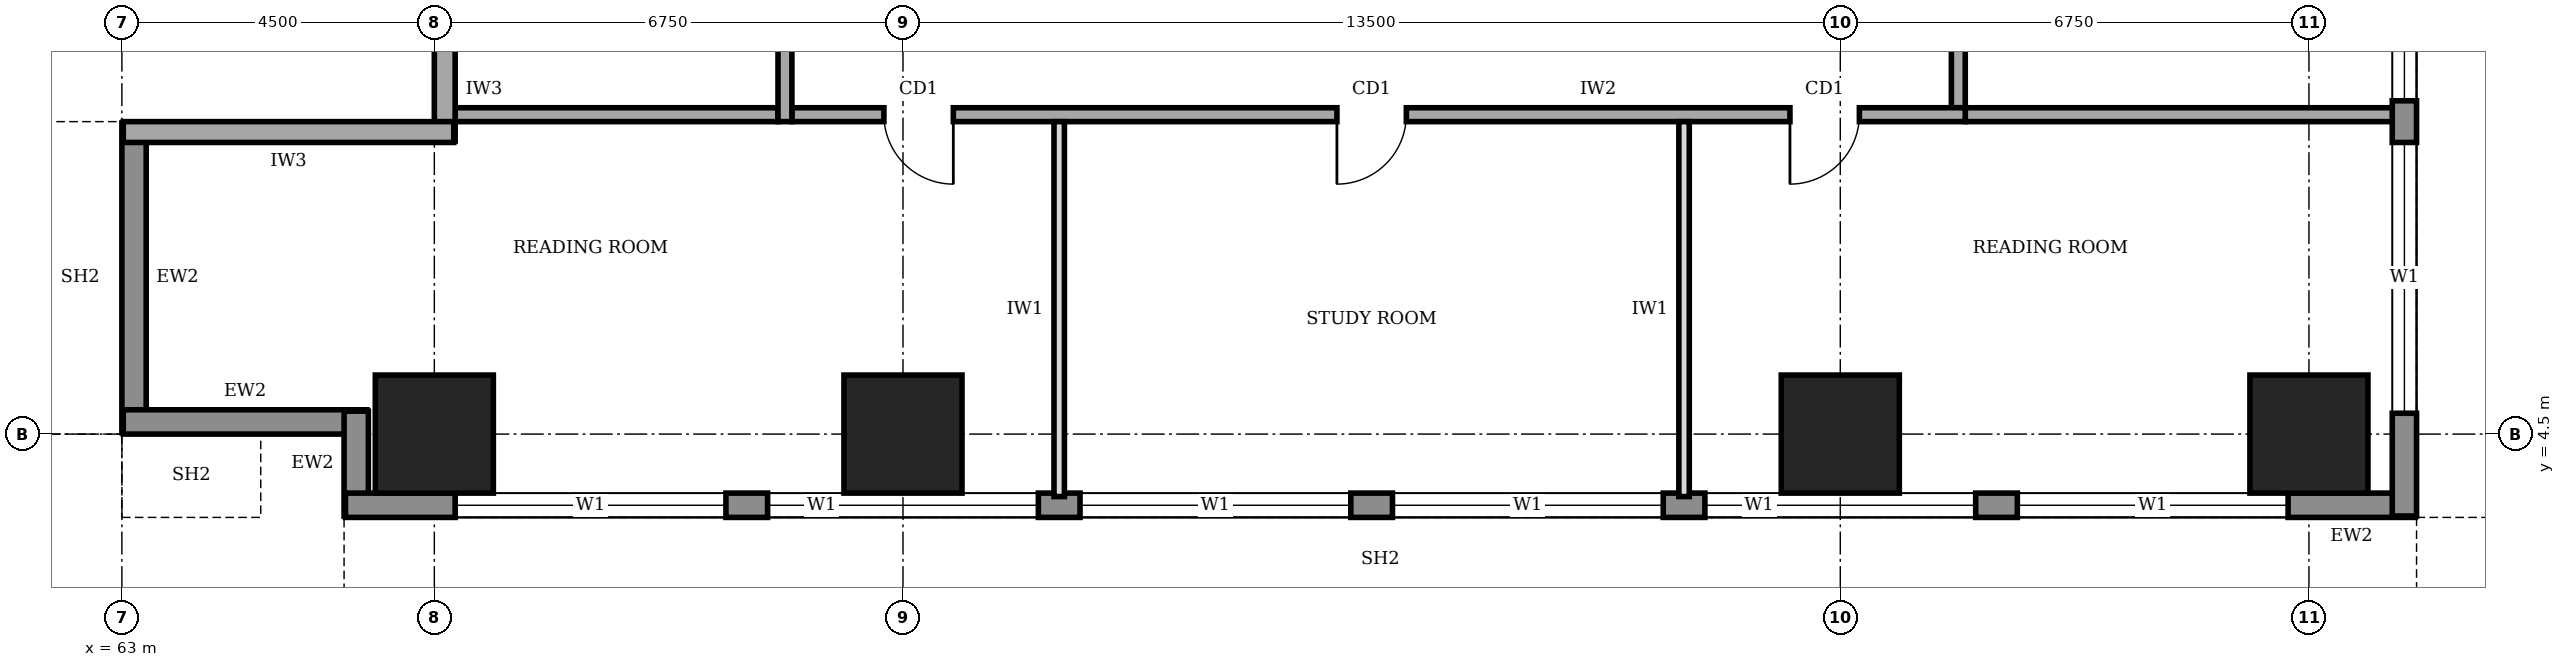
"""IFC4 building model, lengths in metres.
Left out: names, types, materials, properties, quantities, classifications, styles, units other than length and angle.
Written with IfcOpenShell. Run it as: python <this file> out.ifc"""

import sys

from ifc_helpers import new_model, si_unit, direction, frame, frame_2d, origin, origin_2d, place, context, subcontext, project, spatial, rectangle, extrude, element, fill, save


model = new_model("IFC4")
c1 = context("Model", 3, precision=1e-05, world=origin(), true_north=direction((0.0, 1.0)))
c2 = subcontext(c1, "Body", "Model", "MODEL_VIEW")
j1 = project(units=[si_unit("LENGTHUNIT", "METRE"), si_unit("PLANEANGLEUNIT", "RADIAN")], contexts=[c1])
p1 = place(None, origin())
s1 = spatial("IfcSite", under=j1, at=p1, CompositionType="ELEMENT")
p2 = place(p1, origin())
s2 = spatial("IfcBuilding", under=s1, at=p2, CompositionType="ELEMENT")
p3 = place(p2, frame((0.0, 0.0, 105.0)))
s3 = spatial("IfcBuildingStorey", under=s2, at=p3, CompositionType="ELEMENT", Elevation=105.0)
for number, where, z_axis, x_axis in (
    (1, (67.5, 4.5, 0.0), (0.0, 0.0, 1.0), (1.0, 0.0, 0.0)),
    (2, (74.25, 4.5, 0.0), (0.0, 0.0, 1.0), (1.0, 0.0, 0.0)),
    (3, (87.75, 4.5, 0.0), (0.0, 0.0, 1.0), (1.0, 0.0, 0.0)),
    (4, (94.5, 4.5, 0.0), (0.0, 0.0, 1.0), (1.0, 0.0, 0.0)),
):
    element("IfcColumn", number, at=place(p3, frame(where, z_axis=z_axis, x_axis=x_axis)), inside=s3, PredefinedType="COLUMN", context=c2, shape_type="SweptSolid", body=[
        extrude(rectangle(XDim=1.7, YDim=1.7, at=origin_2d()), origin(), (0.0, 0.0, 1.0), 4.0),
    ])
p4 = place(p3, frame((63.175, 8.98, 0.0), z_axis=(0.0, 0.0, 1.0), x_axis=(0.0, -1.0, 0.0)))
e5 = element("IfcWall", 5, at=p4, inside=s3, PredefinedType="STANDARD", context=c2, shape_type="SweptSolid", body=[
    extrude(rectangle(XDim=4.46, YDim=0.35, at=frame_2d((2.23, 0.0))), origin(), (0.0, 0.0, 1.0), 3.75),
])
p5 = place(p3, frame((63.02, 4.675, 0.0), z_axis=(0.0, 0.0, 1.0), x_axis=(1.0, 0.0, 0.0)))
e6 = element("IfcWall", 6, at=p5, inside=s3, PredefinedType="STANDARD", context=c2, shape_type="SweptSolid", body=[
    extrude(rectangle(XDim=3.51, YDim=0.35, at=frame_2d((1.755, 0.0))), origin(), (0.0, 0.0, 1.0), 2.85),
])
p6 = place(p3, frame((66.375, 4.83, 0.0), z_axis=(0.0, 0.0, 1.0), x_axis=(0.0, -1.0, 0.0)))
e7 = element("IfcWall", 7, at=p6, inside=s3, PredefinedType="STANDARD", context=c2, shape_type="SweptSolid", body=[
    extrude(rectangle(XDim=1.51, YDim=0.35, at=frame_2d((0.755, 0.0))), origin(), (0.0, 0.0, 1.0), 3.75),
])
p7 = place(p3, frame((66.22, 3.475, 0.0), z_axis=(0.0, 0.0, 1.0), x_axis=(1.0, 0.0, 0.0)))
e8 = element("IfcWall", 8, at=p7, inside=s3, PredefinedType="STANDARD", context=c2, shape_type="SweptSolid", body=[
    extrude(rectangle(XDim=29.81, YDim=0.35, at=frame_2d((14.905, 0.0))), origin(), (0.0, 0.0, 1.0), 3.75),
])
p8 = place(p7, frame((1.58, 0.0, 0.9)))
e9 = element("IfcOpeningElement", 9, at=p8, cuts=e8, PredefinedType="OPENING", context=c2, shape_type="SweptSolid", body=[
    extrude(rectangle(XDim=3.9, YDim=2.2, at=frame_2d((1.95, 1.1))), frame((0.0, 0.185, 0.0), z_axis=(0.0, -1.0, 0.0), x_axis=(1.0, 0.0, 0.0)), (0.0, 0.0, 1.0), 0.37),
])
p9 = place(p7, frame((6.08, 0.0, 0.9)))
e10 = element("IfcOpeningElement", 10, at=p9, cuts=e8, PredefinedType="OPENING", context=c2, shape_type="SweptSolid", body=[
    extrude(rectangle(XDim=3.9, YDim=2.2, at=frame_2d((1.95, 1.1))), frame((0.0, 0.185, 0.0), z_axis=(0.0, -1.0, 0.0), x_axis=(1.0, 0.0, 0.0)), (0.0, 0.0, 1.0), 0.37),
])
p10 = place(p7, frame((10.58, 0.0, 0.9)))
e11 = element("IfcOpeningElement", 11, at=p10, cuts=e8, PredefinedType="OPENING", context=c2, shape_type="SweptSolid", body=[
    extrude(rectangle(XDim=3.9, YDim=2.2, at=frame_2d((1.95, 1.1))), frame((0.0, 0.185, 0.0), z_axis=(0.0, -1.0, 0.0), x_axis=(1.0, 0.0, 0.0)), (0.0, 0.0, 1.0), 0.37),
])
p11 = place(p7, frame((15.08, 0.0, 0.9)))
e12 = element("IfcOpeningElement", 12, at=p11, cuts=e8, PredefinedType="OPENING", context=c2, shape_type="SweptSolid", body=[
    extrude(rectangle(XDim=3.9, YDim=2.2, at=frame_2d((1.95, 1.1))), frame((0.0, 0.185, 0.0), z_axis=(0.0, -1.0, 0.0), x_axis=(1.0, 0.0, 0.0)), (0.0, 0.0, 1.0), 0.37),
])
p12 = place(p7, frame((19.58, 0.0, 0.9)))
e13 = element("IfcOpeningElement", 13, at=p12, cuts=e8, PredefinedType="OPENING", context=c2, shape_type="SweptSolid", body=[
    extrude(rectangle(XDim=3.9, YDim=2.2, at=frame_2d((1.95, 1.1))), frame((0.0, 0.185, 0.0), z_axis=(0.0, -1.0, 0.0), x_axis=(1.0, 0.0, 0.0)), (0.0, 0.0, 1.0), 0.37),
])
p13 = place(p7, frame((24.08, 0.0, 0.9)))
e14 = element("IfcOpeningElement", 14, at=p13, cuts=e8, PredefinedType="OPENING", context=c2, shape_type="SweptSolid", body=[
    extrude(rectangle(XDim=3.9, YDim=2.2, at=frame_2d((1.95, 1.1))), frame((0.0, 0.185, 0.0), z_axis=(0.0, -1.0, 0.0), x_axis=(1.0, 0.0, 0.0)), (0.0, 0.0, 1.0), 0.37),
])
p14 = place(p3, frame((95.875, 3.32, 0.0), z_axis=(0.0, 0.0, 1.0), x_axis=(0.0, 1.0, 0.0)))
e15 = element("IfcWall", 15, at=p14, inside=s3, PredefinedType="STANDARD", context=c2, shape_type="SweptSolid", body=[
    extrude(rectangle(XDim=33.96, YDim=0.35, at=frame_2d((16.98, 0.0))), origin(), (0.0, 0.0, 1.0), 3.75),
])
p15 = place(p14, frame((1.48, 0.0, 0.9)))
e16 = element("IfcOpeningElement", 16, at=p15, cuts=e15, PredefinedType="OPENING", context=c2, shape_type="SweptSolid", body=[
    extrude(rectangle(XDim=3.9, YDim=2.2, at=frame_2d((1.95, 1.1))), frame((0.0, 0.185, 0.0), z_axis=(0.0, -1.0, 0.0), x_axis=(1.0, 0.0, 0.0)), (0.0, 0.0, 1.0), 0.37),
])
p16 = place(p14, frame((5.98, 0.0, 0.9)))
e17 = element("IfcOpeningElement", 17, at=p16, cuts=e15, PredefinedType="OPENING", context=c2, shape_type="SweptSolid", body=[
    extrude(rectangle(XDim=3.9, YDim=2.2, at=frame_2d((1.95, 1.1))), frame((0.0, 0.185, 0.0), z_axis=(0.0, -1.0, 0.0), x_axis=(1.0, 0.0, 0.0)), (0.0, 0.0, 1.0), 0.37),
])
p17 = place(p14, frame((10.48, 0.0, 0.9)))
e18 = element("IfcOpeningElement", 18, at=p17, cuts=e15, PredefinedType="OPENING", context=c2, shape_type="SweptSolid", body=[
    extrude(rectangle(XDim=3.9, YDim=2.2, at=frame_2d((1.95, 1.1))), frame((0.0, 0.185, 0.0), z_axis=(0.0, -1.0, 0.0), x_axis=(1.0, 0.0, 0.0)), (0.0, 0.0, 1.0), 0.37),
])
p18 = place(p14, frame((14.98, 0.0, 0.9)))
e19 = element("IfcOpeningElement", 19, at=p18, cuts=e15, PredefinedType="OPENING", context=c2, shape_type="SweptSolid", body=[
    extrude(rectangle(XDim=3.9, YDim=2.2, at=frame_2d((1.95, 1.1))), frame((0.0, 0.185, 0.0), z_axis=(0.0, -1.0, 0.0), x_axis=(1.0, 0.0, 0.0)), (0.0, 0.0, 1.0), 0.37),
])
p19 = place(p14, frame((19.48, 0.0, 0.9)))
e20 = element("IfcOpeningElement", 20, at=p19, cuts=e15, PredefinedType="OPENING", context=c2, shape_type="SweptSolid", body=[
    extrude(rectangle(XDim=3.9, YDim=2.2, at=frame_2d((1.95, 1.1))), frame((0.0, 0.185, 0.0), z_axis=(0.0, -1.0, 0.0), x_axis=(1.0, 0.0, 0.0)), (0.0, 0.0, 1.0), 0.37),
])
p20 = place(p14, frame((23.98, 0.0, 0.9)))
e21 = element("IfcOpeningElement", 21, at=p20, cuts=e15, PredefinedType="OPENING", context=c2, shape_type="SweptSolid", body=[
    extrude(rectangle(XDim=3.9, YDim=2.2, at=frame_2d((1.95, 1.1))), frame((0.0, 0.185, 0.0), z_axis=(0.0, -1.0, 0.0), x_axis=(1.0, 0.0, 0.0)), (0.0, 0.0, 1.0), 0.37),
])
p21 = place(p14, frame((28.48, 0.0, 0.9)))
e22 = element("IfcOpeningElement", 22, at=p21, cuts=e15, PredefinedType="OPENING", context=c2, shape_type="SweptSolid", body=[
    extrude(rectangle(XDim=3.9, YDim=2.2, at=frame_2d((1.95, 1.1))), frame((0.0, 0.185, 0.0), z_axis=(0.0, -1.0, 0.0), x_axis=(1.0, 0.0, 0.0)), (0.0, 0.0, 1.0), 0.37),
])
p22 = place(p3, frame((67.65, 10.2, 0.0), z_axis=(0.0, 0.0, 1.0), x_axis=(0.0, -1.0, 0.0)))
e23 = element("IfcWall", 23, at=p22, inside=s3, PredefinedType="SOLIDWALL", context=c2, shape_type="SweptSolid", body=[
    extrude(rectangle(XDim=1.48, YDim=0.3, at=frame_2d((0.74, 0.0))), origin(), (0.0, 0.0, 1.0), 2.65),
])
p23 = place(p3, frame((67.78, 8.85, 0.0), z_axis=(0.0, 0.0, 1.0), x_axis=(-1.0, 0.0, 0.0)))
e24 = element("IfcWall", 24, at=p23, inside=s3, PredefinedType="SOLIDWALL", context=c2, shape_type="SweptSolid", body=[
    extrude(rectangle(XDim=4.76, YDim=0.3, at=frame_2d((2.38, 0.0))), origin(), (0.0, 0.0, 1.0), 3.75),
])
p24 = place(p3, frame((72.65, 9.1, 0.0), z_axis=(0.0, 0.0, 1.0), x_axis=(1.0, 0.0, 0.0)))
e25 = element("IfcWall", 25, at=p24, inside=s3, PredefinedType="SOLIDWALL", context=c2, shape_type="SweptSolid", body=[
    extrude(rectangle(XDim=16.9, YDim=0.2, at=frame_2d((8.45, 0.0))), origin(), (0.0, 0.0, 1.0), 3.75),
])
p25 = place(p24, frame((1.325, 0.0, 0.0)))
e26 = element("IfcOpeningElement", 26, at=p25, cuts=e25, PredefinedType="OPENING", context=c2, shape_type="SweptSolid", body=[
    extrude(rectangle(XDim=1.0, YDim=2.1, at=frame_2d((0.5, 1.05))), frame((0.0, 0.11, 0.0), z_axis=(0.0, -1.0, 0.0), x_axis=(1.0, 0.0, 0.0)), (0.0, 0.0, 1.0), 0.22),
])
p26 = place(p24, frame((7.85, 0.0, 0.0)))
e27 = element("IfcOpeningElement", 27, at=p26, cuts=e25, PredefinedType="OPENING", context=c2, shape_type="SweptSolid", body=[
    extrude(rectangle(XDim=1.0, YDim=2.1, at=frame_2d((0.5, 1.05))), frame((0.0, 0.11, 0.0), z_axis=(0.0, -1.0, 0.0), x_axis=(1.0, 0.0, 0.0)), (0.0, 0.0, 1.0), 0.22),
])
p27 = place(p24, frame((14.375, 0.0, 0.0)))
e28 = element("IfcOpeningElement", 28, at=p27, cuts=e25, PredefinedType="OPENING", context=c2, shape_type="SweptSolid", body=[
    extrude(rectangle(XDim=1.0, YDim=2.1, at=frame_2d((0.5, 1.05))), frame((0.0, 0.11, 0.0), z_axis=(0.0, -1.0, 0.0), x_axis=(1.0, 0.0, 0.0)), (0.0, 0.0, 1.0), 0.22),
])
p28 = place(p3, frame((89.45, 9.2, 0.0), z_axis=(0.0, 0.0, 1.0), x_axis=(0.0, 1.0, 0.0)))
e29 = element("IfcWall", 29, at=p28, inside=s3, PredefinedType="SOLIDWALL", context=c2, shape_type="SweptSolid", body=[
    extrude(rectangle(XDim=23.8, YDim=0.2, at=frame_2d((11.9, 0.0))), origin(), (0.0, 0.0, 1.0), 3.75),
])
p29 = place(p28, frame((1.625, 0.0, 0.0)))
e30 = element("IfcOpeningElement", 30, at=p29, cuts=e29, PredefinedType="OPENING", context=c2, shape_type="SweptSolid", body=[
    extrude(rectangle(XDim=1.0, YDim=2.1, at=frame_2d((0.5, 1.05))), frame((0.0, 0.11, 0.0), z_axis=(0.0, -1.0, 0.0), x_axis=(1.0, 0.0, 0.0)), (0.0, 0.0, 1.0), 0.22),
])
p30 = place(p28, frame((5.2, 0.0, 0.0)))
e31 = element("IfcOpeningElement", 31, at=p30, cuts=e29, PredefinedType="OPENING", context=c2, shape_type="SweptSolid", body=[
    extrude(rectangle(XDim=0.9, YDim=2.1, at=frame_2d((0.45, 1.05))), frame((0.0, 0.11, 0.0), z_axis=(0.0, -1.0, 0.0), x_axis=(1.0, 0.0, 0.0)), (0.0, 0.0, 1.0), 0.22),
])
p31 = place(p28, frame((8.325, 0.0, 0.0)))
e32 = element("IfcOpeningElement", 32, at=p31, cuts=e29, PredefinedType="OPENING", context=c2, shape_type="SweptSolid", body=[
    extrude(rectangle(XDim=0.9, YDim=2.1, at=frame_2d((0.45, 1.05))), frame((0.0, 0.11, 0.0), z_axis=(0.0, -1.0, 0.0), x_axis=(1.0, 0.0, 0.0)), (0.0, 0.0, 1.0), 0.22),
])
p32 = place(p28, frame((13.725, 0.0, 0.0)))
e33 = element("IfcOpeningElement", 33, at=p32, cuts=e29, PredefinedType="OPENING", context=c2, shape_type="SweptSolid", body=[
    extrude(rectangle(XDim=0.9, YDim=2.1, at=frame_2d((0.45, 1.05))), frame((0.0, 0.11, 0.0), z_axis=(0.0, -1.0, 0.0), x_axis=(1.0, 0.0, 0.0)), (0.0, 0.0, 1.0), 0.22),
])
p33 = place(p28, frame((16.15, 0.0, 0.0)))
e34 = element("IfcOpeningElement", 34, at=p33, cuts=e29, PredefinedType="OPENING", context=c2, shape_type="SweptSolid", body=[
    extrude(rectangle(XDim=1.0, YDim=2.1, at=frame_2d((0.5, 1.05))), frame((0.0, 0.11, 0.0), z_axis=(0.0, -1.0, 0.0), x_axis=(1.0, 0.0, 0.0)), (0.0, 0.0, 1.0), 0.22),
])
p34 = place(p28, frame((11.2, 0.0, 0.0)))
e35 = element("IfcOpeningElement", 35, at=p34, cuts=e29, PredefinedType="OPENING", context=c2, shape_type="SweptSolid", body=[
    extrude(rectangle(XDim=1.0, YDim=2.1, at=frame_2d((0.5, 1.05))), frame((0.0, 0.11, 0.0), z_axis=(0.0, -1.0, 0.0), x_axis=(1.0, 0.0, 0.0)), (0.0, 0.0, 1.0), 0.22),
])
p35 = place(p28, frame((20.225, 0.0, 0.0)))
e36 = element("IfcOpeningElement", 36, at=p35, cuts=e29, PredefinedType="OPENING", context=c2, shape_type="SweptSolid", body=[
    extrude(rectangle(XDim=1.0, YDim=2.1, at=frame_2d((0.5, 1.05))), frame((0.0, 0.11, 0.0), z_axis=(0.0, -1.0, 0.0), x_axis=(1.0, 0.0, 0.0)), (0.0, 0.0, 1.0), 0.22),
])
p36 = place(p3, frame((72.55, 32.8, 0.0), z_axis=(0.0, 0.0, 1.0), x_axis=(0.0, -1.0, 0.0)))
e37 = element("IfcWall", 37, at=p36, inside=s3, PredefinedType="SOLIDWALL", context=c2, shape_type="SweptSolid", body=[
    extrude(rectangle(XDim=23.8, YDim=0.2, at=frame_2d((11.9, 0.0))), origin(), (0.0, 0.0, 1.0), 3.75),
])
p37 = place(p36, frame((10.9, 0.0, 0.0)))
e38 = element("IfcOpeningElement", 38, at=p37, cuts=e37, PredefinedType="OPENING", context=c2, shape_type="SweptSolid", body=[
    extrude(rectangle(XDim=1.8, YDim=2.1, at=frame_2d((0.9, 1.05))), frame((0.0, 0.11, 0.0), z_axis=(0.0, -1.0, 0.0), x_axis=(1.0, 0.0, 0.0)), (0.0, 0.0, 1.0), 0.22),
])
p38 = place(p3, frame((67.8, 9.1, 0.0), z_axis=(0.0, 0.0, 1.0), x_axis=(1.0, 0.0, 0.0)))
e39 = element("IfcWall", 39, at=p38, inside=s3, PredefinedType="SOLIDWALL", context=c2, shape_type="SweptSolid", body=[
    extrude(rectangle(XDim=4.65, YDim=0.2, at=frame_2d((2.325, 0.0))), origin(), (0.0, 0.0, 1.0), 3.75),
])
p39 = place(p3, frame((89.55, 9.1, 0.0), z_axis=(0.0, 0.0, 1.0), x_axis=(1.0, 0.0, 0.0)))
e40 = element("IfcWall", 40, at=p39, inside=s3, PredefinedType="SOLIDWALL", context=c2, shape_type="SweptSolid", body=[
    extrude(rectangle(XDim=6.2, YDim=0.2, at=frame_2d((3.1, 0.0))), origin(), (0.0, 0.0, 1.0), 3.75),
])
for number, where, z_axis, x_axis in (
    (41, (76.5, 3.6, 0.0), (0.0, 0.0, 1.0), (0.0, 1.0, 0.0)),
    (42, (85.5, 3.6, 0.0), (0.0, 0.0, 1.0), (0.0, 1.0, 0.0)),
):
    element("IfcWall", number, at=place(p3, frame(where, z_axis=z_axis, x_axis=x_axis)), inside=s3, PredefinedType="PARTITIONING", context=c2, shape_type="SweptSolid", body=[
        extrude(rectangle(XDim=5.4, YDim=0.15, at=frame_2d((2.7, 0.0))), origin(), (0.0, 0.0, 1.0), 3.75),
    ])
p40 = place(p8, origin())
e43 = element("IfcWindow", 43, at=p40, inside=s3, PartitioningType="SINGLE_PANEL", PredefinedType="WINDOW", context=c2, shape_type="SweptSolid", body=[
    extrude(rectangle(XDim=3.9, YDim=2.2, at=frame_2d((1.95, 1.1))), frame((0.0, 0.03, 0.0), z_axis=(0.0, -1.0, 0.0), x_axis=(1.0, 0.0, 0.0)), (0.0, 0.0, 1.0), 0.06),
])
fill(e9, e43)
p41 = place(p9, origin())
e44 = element("IfcWindow", 44, at=p41, inside=s3, PartitioningType="SINGLE_PANEL", PredefinedType="WINDOW", context=c2, shape_type="SweptSolid", body=[
    extrude(rectangle(XDim=3.9, YDim=2.2, at=frame_2d((1.95, 1.1))), frame((0.0, 0.03, 0.0), z_axis=(0.0, -1.0, 0.0), x_axis=(1.0, 0.0, 0.0)), (0.0, 0.0, 1.0), 0.06),
])
fill(e10, e44)
p42 = place(p10, origin())
e45 = element("IfcWindow", 45, at=p42, inside=s3, PartitioningType="SINGLE_PANEL", PredefinedType="WINDOW", context=c2, shape_type="SweptSolid", body=[
    extrude(rectangle(XDim=3.9, YDim=2.2, at=frame_2d((1.95, 1.1))), frame((0.0, 0.03, 0.0), z_axis=(0.0, -1.0, 0.0), x_axis=(1.0, 0.0, 0.0)), (0.0, 0.0, 1.0), 0.06),
])
fill(e11, e45)
p43 = place(p11, origin())
e46 = element("IfcWindow", 46, at=p43, inside=s3, PartitioningType="SINGLE_PANEL", PredefinedType="WINDOW", context=c2, shape_type="SweptSolid", body=[
    extrude(rectangle(XDim=3.9, YDim=2.2, at=frame_2d((1.95, 1.1))), frame((0.0, 0.03, 0.0), z_axis=(0.0, -1.0, 0.0), x_axis=(1.0, 0.0, 0.0)), (0.0, 0.0, 1.0), 0.06),
])
fill(e12, e46)
p44 = place(p12, origin())
e47 = element("IfcWindow", 47, at=p44, inside=s3, PartitioningType="SINGLE_PANEL", PredefinedType="WINDOW", context=c2, shape_type="SweptSolid", body=[
    extrude(rectangle(XDim=3.9, YDim=2.2, at=frame_2d((1.95, 1.1))), frame((0.0, 0.03, 0.0), z_axis=(0.0, -1.0, 0.0), x_axis=(1.0, 0.0, 0.0)), (0.0, 0.0, 1.0), 0.06),
])
fill(e13, e47)
p45 = place(p13, origin())
e48 = element("IfcWindow", 48, at=p45, inside=s3, PartitioningType="SINGLE_PANEL", PredefinedType="WINDOW", context=c2, shape_type="SweptSolid", body=[
    extrude(rectangle(XDim=3.9, YDim=2.2, at=frame_2d((1.95, 1.1))), frame((0.0, 0.03, 0.0), z_axis=(0.0, -1.0, 0.0), x_axis=(1.0, 0.0, 0.0)), (0.0, 0.0, 1.0), 0.06),
])
fill(e14, e48)
p46 = place(p15, origin())
e49 = element("IfcWindow", 49, at=p46, inside=s3, PartitioningType="SINGLE_PANEL", PredefinedType="WINDOW", context=c2, shape_type="SweptSolid", body=[
    extrude(rectangle(XDim=3.9, YDim=2.2, at=frame_2d((1.95, 1.1))), frame((0.0, 0.03, 0.0), z_axis=(0.0, -1.0, 0.0), x_axis=(1.0, 0.0, 0.0)), (0.0, 0.0, 1.0), 0.06),
])
fill(e16, e49)
p47 = place(p16, origin())
e50 = element("IfcWindow", 50, at=p47, inside=s3, PartitioningType="SINGLE_PANEL", PredefinedType="WINDOW", context=c2, shape_type="SweptSolid", body=[
    extrude(rectangle(XDim=3.9, YDim=2.2, at=frame_2d((1.95, 1.1))), frame((0.0, 0.03, 0.0), z_axis=(0.0, -1.0, 0.0), x_axis=(1.0, 0.0, 0.0)), (0.0, 0.0, 1.0), 0.06),
])
fill(e17, e50)
p48 = place(p25, frame((1.0, 0.0, 0.0), z_axis=(0.0, 0.0, 1.0), x_axis=(-1.0, 0.0, 0.0)))
e51 = element("IfcDoor", 51, at=p48, inside=s3, OperationType="SINGLE_SWING_LEFT", PredefinedType="DOOR", context=c2, shape_type="SweptSolid", body=[
    extrude(rectangle(XDim=1.0, YDim=2.1, at=frame_2d((0.5, 1.05))), frame((0.0, 0.025, 0.0), z_axis=(0.0, -1.0, 0.0), x_axis=(1.0, 0.0, 0.0)), (0.0, 0.0, 1.0), 0.05),
])
fill(e26, e51)
p49 = place(p26, frame((1.0, 0.0, 0.0), z_axis=(0.0, 0.0, 1.0), x_axis=(-1.0, 0.0, 0.0)))
e52 = element("IfcDoor", 52, at=p49, inside=s3, OperationType="SINGLE_SWING_RIGHT", PredefinedType="DOOR", context=c2, shape_type="SweptSolid", body=[
    extrude(rectangle(XDim=1.0, YDim=2.1, at=frame_2d((0.5, 1.05))), frame((0.0, 0.025, 0.0), z_axis=(0.0, -1.0, 0.0), x_axis=(1.0, 0.0, 0.0)), (0.0, 0.0, 1.0), 0.05),
])
fill(e27, e52)
p50 = place(p27, frame((1.0, 0.0, 0.0), z_axis=(0.0, 0.0, 1.0), x_axis=(-1.0, 0.0, 0.0)))
e53 = element("IfcDoor", 53, at=p50, inside=s3, OperationType="SINGLE_SWING_RIGHT", PredefinedType="DOOR", context=c2, shape_type="SweptSolid", body=[
    extrude(rectangle(XDim=1.0, YDim=2.1, at=frame_2d((0.5, 1.05))), frame((0.0, 0.025, 0.0), z_axis=(0.0, -1.0, 0.0), x_axis=(1.0, 0.0, 0.0)), (0.0, 0.0, 1.0), 0.05),
])
fill(e28, e53)
save(model, sys.argv[1])
